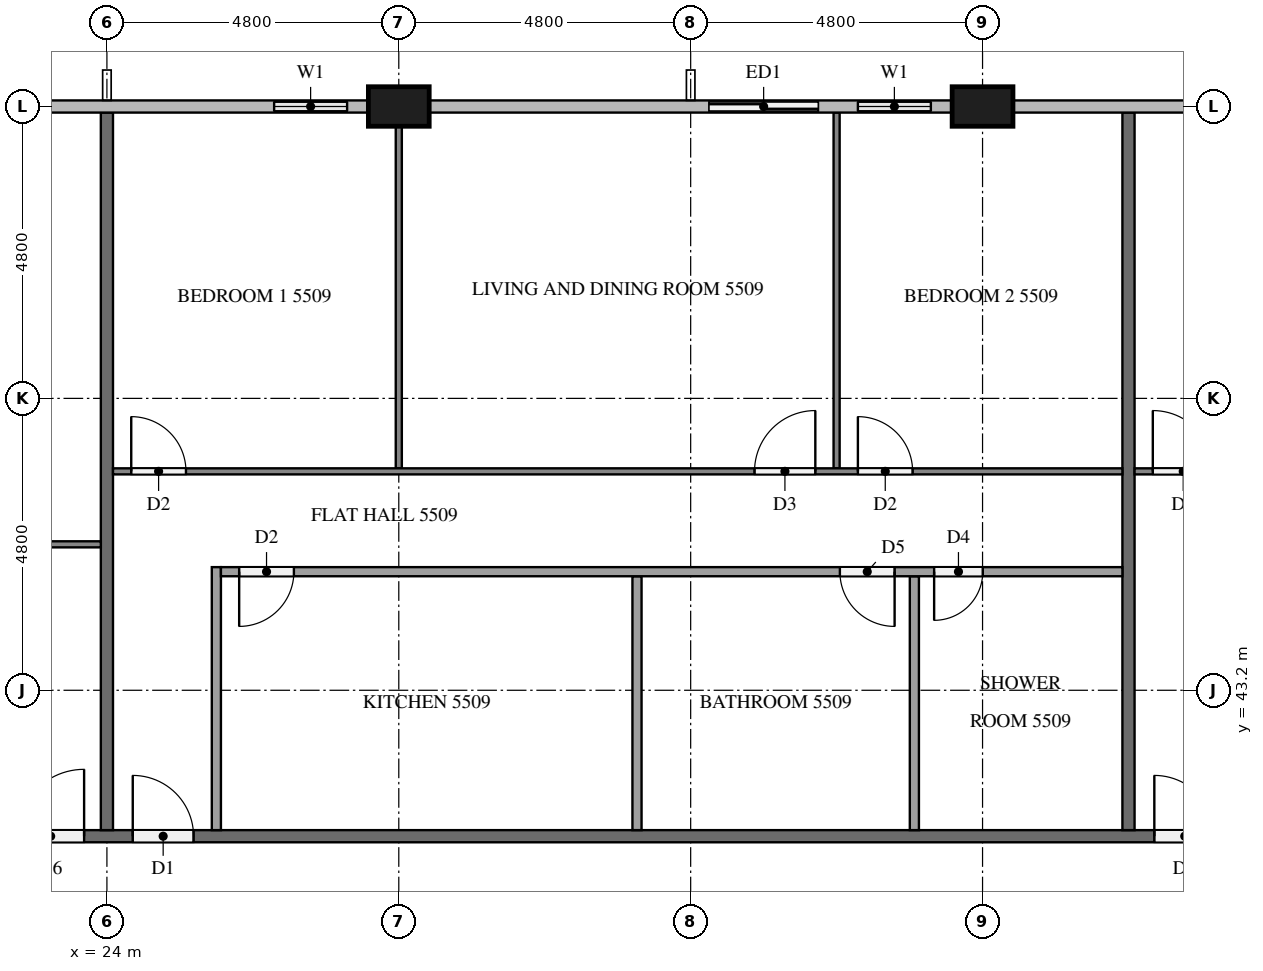
"""IFC4 building model, lengths in metres.
Left out: names, types, materials, properties, quantities, classifications, styles, units other than length and angle.
Written with IfcOpenShell. Run it as: python <this file> out.ifc"""

import sys

from ifc_helpers import new_model, si_unit, direction, frame, frame_2d, origin, origin_2d, place, context, subcontext, project, spatial, rectangle, extrude, element, fill, save


model = new_model("IFC4")
c1 = context("Model", 3, precision=1e-05, world=origin(), true_north=direction((0.0, 1.0)))
c2 = subcontext(c1, "Body", "Model", "MODEL_VIEW")
j1 = project(units=[si_unit("LENGTHUNIT", "METRE"), si_unit("PLANEANGLEUNIT", "RADIAN")], contexts=[c1])
p1 = place(None, origin())
s1 = spatial("IfcSite", under=j1, at=p1, CompositionType="ELEMENT")
p2 = place(p1, origin())
s2 = spatial("IfcBuilding", under=s1, at=p2, CompositionType="ELEMENT")
p3 = place(p2, frame((0.0, 0.0, 212.3)))
s3 = spatial("IfcBuildingStorey", under=s2, at=p3, CompositionType="ELEMENT", Elevation=212.3)
for number, where, z_axis, x_axis in (
    (1, (38.4, 52.8, 0.0), (0.0, 0.0, 1.0), (1.0, 0.0, 0.0)),
    (2, (28.8, 52.8, 0.0), (0.0, 0.0, 1.0), (1.0, 0.0, 0.0)),
):
    element("IfcColumn", number, at=place(p3, frame(where, z_axis=z_axis, x_axis=x_axis)), inside=s3, PredefinedType="COLUMN", context=c2, shape_type="SweptSolid", body=[
        extrude(rectangle(XDim=1.0, YDim=0.65, at=origin_2d()), origin(), (0.0, 0.0, 1.0), 3.2),
    ])
p4 = place(p3, frame((37.9, 52.8, 0.0), z_axis=(0.0, 0.0, 1.0), x_axis=(-1.0, 0.0, 0.0)))
e3 = element("IfcWall", 3, at=p4, inside=s3, PredefinedType="SOLIDWALL", context=c2, shape_type="SweptSolid", body=[
    extrude(rectangle(XDim=4.3, YDim=0.15, at=frame_2d((2.15, 0.0))), origin(), (0.0, 0.0, 1.0), 3.2),
])
p5 = place(p4, frame((0.35, 0.0, 0.9)))
e4 = element("IfcOpeningElement", 4, at=p5, cuts=e3, PredefinedType="OPENING", context=c2, shape_type="SweptSolid", body=[
    extrude(rectangle(XDim=1.2, YDim=1.4, at=frame_2d((0.6, 0.7))), frame((0.0, 0.085, 0.0), z_axis=(0.0, -1.0, 0.0), x_axis=(1.0, 0.0, 0.0)), (0.0, 0.0, 1.0), 0.17),
])
p6 = place(p4, frame((2.2, 0.0, 0.0)))
e5 = element("IfcOpeningElement", 5, at=p6, cuts=e3, PredefinedType="OPENING", context=c2, shape_type="SweptSolid", body=[
    extrude(rectangle(XDim=1.8, YDim=2.4, at=frame_2d((0.9, 1.2))), frame((0.0, 0.085, 0.0), z_axis=(0.0, -1.0, 0.0), x_axis=(1.0, 0.0, 0.0)), (0.0, 0.0, 1.0), 0.17),
])
p7 = place(p3, frame((28.3, 52.8, 0.0), z_axis=(0.0, 0.0, 1.0), x_axis=(-1.0, 0.0, 0.0)))
e6 = element("IfcWall", 6, at=p7, inside=s3, PredefinedType="SOLIDWALL", context=c2, shape_type="SweptSolid", body=[
    extrude(rectangle(XDim=1.9, YDim=0.15, at=frame_2d((0.95, 0.0))), origin(), (0.0, 0.0, 1.0), 3.2),
])
p8 = place(p7, frame((0.35, 0.0, 0.9)))
e7 = element("IfcOpeningElement", 7, at=p8, cuts=e6, PredefinedType="OPENING", context=c2, shape_type="SweptSolid", body=[
    extrude(rectangle(XDim=1.2, YDim=1.4, at=frame_2d((0.6, 0.7))), frame((0.0, 0.085, 0.0), z_axis=(0.0, -1.0, 0.0), x_axis=(1.0, 0.0, 0.0)), (0.0, 0.0, 1.0), 0.17),
])
p9 = place(p3, frame((11.9, 40.8, 0.0), z_axis=(0.0, 0.0, 1.0), x_axis=(1.0, 0.0, 0.0)))
e8 = element("IfcWall", 8, at=p9, inside=s3, PredefinedType="PARTITIONING", context=c2, shape_type="SweptSolid", body=[
    extrude(rectangle(XDim=38.6, YDim=0.2, at=frame_2d((19.3, 0.0))), origin(), (0.0, 0.0, 1.0), 3.2),
])
p10 = place(p9, frame((36.525, 0.0, 0.0)))
e9 = element("IfcOpeningElement", 9, at=p10, cuts=e8, PredefinedType="OPENING", context=c2, shape_type="SweptSolid", body=[
    extrude(rectangle(XDim=1.0, YDim=2.1, at=frame_2d((0.5, 1.05))), frame((0.0, 0.11, 0.0), z_axis=(0.0, -1.0, 0.0), x_axis=(1.0, 0.0, 0.0)), (0.0, 0.0, 1.0), 0.22),
])
p11 = place(p9, frame((29.325, 0.0, 0.0)))
e10 = element("IfcOpeningElement", 10, at=p11, cuts=e8, PredefinedType="OPENING", context=c2, shape_type="SweptSolid", body=[
    extrude(rectangle(XDim=1.0, YDim=2.1, at=frame_2d((0.5, 1.05))), frame((0.0, 0.11, 0.0), z_axis=(0.0, -1.0, 0.0), x_axis=(1.0, 0.0, 0.0)), (0.0, 0.0, 1.0), 0.22),
])
p12 = place(p9, frame((12.525, 0.0, 0.0)))
e11 = element("IfcOpeningElement", 11, at=p12, cuts=e8, PredefinedType="OPENING", context=c2, shape_type="SweptSolid", body=[
    extrude(rectangle(XDim=1.0, YDim=2.1, at=frame_2d((0.5, 1.05))), frame((0.0, 0.11, 0.0), z_axis=(0.0, -1.0, 0.0), x_axis=(1.0, 0.0, 0.0)), (0.0, 0.0, 1.0), 0.22),
])
p13 = place(p9, frame((10.625, 0.0, 0.0)))
e12 = element("IfcOpeningElement", 12, at=p13, cuts=e8, PredefinedType="OPENING", context=c2, shape_type="SweptSolid", body=[
    extrude(rectangle(XDim=1.1, YDim=2.1, at=frame_2d((0.55, 1.05))), frame((0.0, 0.11, 0.0), z_axis=(0.0, -1.0, 0.0), x_axis=(1.0, 0.0, 0.0)), (0.0, 0.0, 1.0), 0.22),
])
for number, where, z_axis, x_axis in (
    (13, (40.8, 52.7, 0.0), (0.0, 0.0, 1.0), (0.0, -1.0, 0.0)),
    (14, (24.0, 52.7, 0.0), (0.0, 0.0, 1.0), (0.0, -1.0, 0.0)),
):
    element("IfcWall", number, at=place(p3, frame(where, z_axis=z_axis, x_axis=x_axis)), inside=s3, PredefinedType="PARTITIONING", context=c2, shape_type="SweptSolid", body=[
        extrude(rectangle(XDim=11.8, YDim=0.2, at=frame_2d((5.9, 0.0))), origin(), (0.0, 0.0, 1.0), 3.2),
    ])
p14 = place(p3, frame((40.9, 46.8, 0.0), z_axis=(0.0, 0.0, 1.0), x_axis=(1.0, 0.0, 0.0)))
e15 = element("IfcWall", 15, at=p14, inside=s3, PredefinedType="PARTITIONING", context=c2, shape_type="SweptSolid", body=[
    extrude(rectangle(XDim=7.0, YDim=0.1, at=frame_2d((3.5, 0.0))), origin(), (0.0, 0.0, 1.0), 3.2),
])
p15 = place(p14, frame((0.3, 0.0, 0.0)))
e16 = element("IfcOpeningElement", 16, at=p15, cuts=e15, PredefinedType="OPENING", context=c2, shape_type="SweptSolid", body=[
    extrude(rectangle(XDim=1.0, YDim=2.1, at=frame_2d((0.5, 1.05))), frame((0.0, 0.06, 0.0), z_axis=(0.0, -1.0, 0.0), x_axis=(1.0, 0.0, 0.0)), (0.0, 0.0, 1.0), 0.12),
])
p16 = place(p3, frame((28.8, 46.85, 0.0), z_axis=(0.0, 0.0, 1.0), x_axis=(0.0, 1.0, 0.0)))
e17 = element("IfcWall", 17, at=p16, inside=s3, PredefinedType="PARTITIONING", context=c2, shape_type="SweptSolid", body=[
    extrude(rectangle(XDim=5.625, YDim=0.1, at=frame_2d((2.812, 0.0))), origin(), (0.0, 0.0, 1.0), 3.2),
])
p17 = place(p3, frame((36.0, 46.85, 0.0), z_axis=(0.0, 0.0, 1.0), x_axis=(0.0, 1.0, 0.0)))
e18 = element("IfcWall", 18, at=p17, inside=s3, PredefinedType="PARTITIONING", context=c2, shape_type="SweptSolid", body=[
    extrude(rectangle(XDim=5.85, YDim=0.1, at=frame_2d((2.925, 0.0))), origin(), (0.0, 0.0, 1.0), 3.2),
])
p18 = place(p3, frame((24.1, 46.8, 0.0), z_axis=(0.0, 0.0, 1.0), x_axis=(1.0, 0.0, 0.0)))
e19 = element("IfcWall", 19, at=p18, inside=s3, PredefinedType="PARTITIONING", context=c2, shape_type="SweptSolid", body=[
    extrude(rectangle(XDim=16.6, YDim=0.1, at=frame_2d((8.3, 0.0))), origin(), (0.0, 0.0, 1.0), 3.2),
])
p19 = place(p18, frame((0.3, 0.0, 0.0)))
e20 = element("IfcOpeningElement", 20, at=p19, cuts=e19, PredefinedType="OPENING", context=c2, shape_type="SweptSolid", body=[
    extrude(rectangle(XDim=0.9, YDim=2.1, at=frame_2d((0.45, 1.05))), frame((0.0, 0.06, 0.0), z_axis=(0.0, -1.0, 0.0), x_axis=(1.0, 0.0, 0.0)), (0.0, 0.0, 1.0), 0.12),
])
p20 = place(p18, frame((10.55, 0.0, 0.0)))
e21 = element("IfcOpeningElement", 21, at=p20, cuts=e19, PredefinedType="OPENING", context=c2, shape_type="SweptSolid", body=[
    extrude(rectangle(XDim=1.0, YDim=2.1, at=frame_2d((0.5, 1.05))), frame((0.0, 0.06, 0.0), z_axis=(0.0, -1.0, 0.0), x_axis=(1.0, 0.0, 0.0)), (0.0, 0.0, 1.0), 0.12),
])
p21 = place(p18, frame((12.25, 0.0, 0.0)))
e22 = element("IfcOpeningElement", 22, at=p21, cuts=e19, PredefinedType="OPENING", context=c2, shape_type="SweptSolid", body=[
    extrude(rectangle(XDim=0.9, YDim=2.1, at=frame_2d((0.45, 1.05))), frame((0.0, 0.06, 0.0), z_axis=(0.0, -1.0, 0.0), x_axis=(1.0, 0.0, 0.0)), (0.0, 0.0, 1.0), 0.12),
])
for number, where, z_axis, x_axis in (
    (23, (32.717, 40.9, 0.0), (0.0, 0.0, 1.0), (0.0, 1.0, 0.0)),
    (24, (37.279, 40.9, 0.0), (0.0, 0.0, 1.0), (0.0, 1.0, 0.0)),
):
    element("IfcWall", number, at=place(p3, frame(where, z_axis=z_axis, x_axis=x_axis)), inside=s3, PredefinedType="PARTITIONING", context=c2, shape_type="SweptSolid", body=[
        extrude(rectangle(XDim=4.175, YDim=0.15, at=frame_2d((2.087, 0.0))), origin(), (0.0, 0.0, 1.0), 3.2),
    ])
p22 = place(p3, frame((25.8, 40.9, 0.0), z_axis=(0.0, 0.0, 1.0), x_axis=(0.0, 1.0, 0.0)))
e25 = element("IfcWall", 25, at=p22, inside=s3, PredefinedType="PARTITIONING", context=c2, shape_type="SweptSolid", body=[
    extrude(rectangle(XDim=4.325, YDim=0.15, at=frame_2d((2.163, 0.0))), origin(), (0.0, 0.0, 1.0), 3.2),
])
p23 = place(p3, frame((40.7, 45.15, 0.0), z_axis=(0.0, 0.0, 1.0), x_axis=(-1.0, 0.0, 0.0)))
e26 = element("IfcWall", 26, at=p23, inside=s3, PredefinedType="PARTITIONING", context=c2, shape_type="SweptSolid", body=[
    extrude(rectangle(XDim=14.825, YDim=0.15, at=frame_2d((7.413, 0.0))), origin(), (0.0, 0.0, 1.0), 3.2),
])
p24 = place(p23, frame((13.625, 0.0, 0.0)))
e27 = element("IfcOpeningElement", 27, at=p24, cuts=e26, PredefinedType="OPENING", context=c2, shape_type="SweptSolid", body=[
    extrude(rectangle(XDim=0.9, YDim=2.1, at=frame_2d((0.45, 1.05))), frame((0.0, 0.085, 0.0), z_axis=(0.0, -1.0, 0.0), x_axis=(1.0, 0.0, 0.0)), (0.0, 0.0, 1.0), 0.17),
])
p25 = place(p23, frame((3.746, 0.0, 0.0)))
e28 = element("IfcOpeningElement", 28, at=p25, cuts=e26, PredefinedType="OPENING", context=c2, shape_type="SweptSolid", body=[
    extrude(rectangle(XDim=0.9, YDim=2.1, at=frame_2d((0.45, 1.05))), frame((0.0, 0.085, 0.0), z_axis=(0.0, -1.0, 0.0), x_axis=(1.0, 0.0, 0.0)), (0.0, 0.0, 1.0), 0.17),
])
p26 = place(p23, frame((2.296, 0.0, 0.0)))
e29 = element("IfcOpeningElement", 29, at=p26, cuts=e26, PredefinedType="OPENING", context=c2, shape_type="SweptSolid", body=[
    extrude(rectangle(XDim=0.8, YDim=2.1, at=frame_2d((0.4, 1.05))), frame((0.0, 0.085, 0.0), z_axis=(0.0, -1.0, 0.0), x_axis=(1.0, 0.0, 0.0)), (0.0, 0.0, 1.0), 0.17),
])
p27 = place(p3, frame((4.9, 45.6, 0.0), z_axis=(0.0, 0.0, 1.0), x_axis=(1.0, 0.0, 0.0)))
e30 = element("IfcWall", 30, at=p27, inside=s3, PredefinedType="PARTITIONING", context=c2, shape_type="SweptSolid", body=[
    extrude(rectangle(XDim=19.0, YDim=0.1, at=frame_2d((9.5, 0.0))), origin(), (0.0, 0.0, 1.0), 3.2),
])
p28 = place(p27, frame((14.65, 0.0, 0.0)))
e31 = element("IfcOpeningElement", 31, at=p28, cuts=e30, PredefinedType="OPENING", context=c2, shape_type="SweptSolid", body=[
    extrude(rectangle(XDim=0.9, YDim=2.1, at=frame_2d((0.45, 1.05))), frame((0.0, 0.06, 0.0), z_axis=(0.0, -1.0, 0.0), x_axis=(1.0, 0.0, 0.0)), (0.0, 0.0, 1.0), 0.12),
])
p29 = place(p27, frame((13.05, 0.0, 0.0)))
e32 = element("IfcOpeningElement", 32, at=p29, cuts=e30, PredefinedType="OPENING", context=c2, shape_type="SweptSolid", body=[
    extrude(rectangle(XDim=0.9, YDim=2.1, at=frame_2d((0.45, 1.05))), frame((0.0, 0.06, 0.0), z_axis=(0.0, -1.0, 0.0), x_axis=(1.0, 0.0, 0.0)), (0.0, 0.0, 1.0), 0.12),
])
p30 = place(p27, frame((5.05, 0.0, 0.0)))
e33 = element("IfcOpeningElement", 33, at=p30, cuts=e30, PredefinedType="OPENING", context=c2, shape_type="SweptSolid", body=[
    extrude(rectangle(XDim=0.9, YDim=2.1, at=frame_2d((0.45, 1.05))), frame((0.0, 0.06, 0.0), z_axis=(0.0, -1.0, 0.0), x_axis=(1.0, 0.0, 0.0)), (0.0, 0.0, 1.0), 0.12),
])
p31 = place(p27, frame((3.35, 0.0, 0.0)))
e34 = element("IfcOpeningElement", 34, at=p31, cuts=e30, PredefinedType="OPENING", context=c2, shape_type="SweptSolid", body=[
    extrude(rectangle(XDim=1.0, YDim=2.1, at=frame_2d((0.5, 1.05))), frame((0.0, 0.06, 0.0), z_axis=(0.0, -1.0, 0.0), x_axis=(1.0, 0.0, 0.0)), (0.0, 0.0, 1.0), 0.12),
])
p32 = place(p5, origin())
e35 = element("IfcWindow", 35, at=p32, inside=s3, PartitioningType="SINGLE_PANEL", PredefinedType="WINDOW", context=c2, shape_type="SweptSolid", body=[
    extrude(rectangle(XDim=1.2, YDim=1.4, at=frame_2d((0.6, 0.7))), frame((0.0, 0.03, 0.0), z_axis=(0.0, -1.0, 0.0), x_axis=(1.0, 0.0, 0.0)), (0.0, 0.0, 1.0), 0.06),
])
fill(e4, e35)
p33 = place(p6, origin())
e36 = element("IfcDoor", 36, at=p33, inside=s3, OperationType="SLIDING_TO_RIGHT", PredefinedType="DOOR", context=c2, shape_type="SweptSolid", body=[
    extrude(rectangle(XDim=1.8, YDim=2.4, at=frame_2d((0.9, 1.2))), frame((0.0, 0.025, 0.0), z_axis=(0.0, -1.0, 0.0), x_axis=(1.0, 0.0, 0.0)), (0.0, 0.0, 1.0), 0.05),
])
fill(e5, e36)
p34 = place(p8, origin())
e37 = element("IfcWindow", 37, at=p34, inside=s3, PartitioningType="SINGLE_PANEL", PredefinedType="WINDOW", context=c2, shape_type="SweptSolid", body=[
    extrude(rectangle(XDim=1.2, YDim=1.4, at=frame_2d((0.6, 0.7))), frame((0.0, 0.03, 0.0), z_axis=(0.0, -1.0, 0.0), x_axis=(1.0, 0.0, 0.0)), (0.0, 0.0, 1.0), 0.06),
])
fill(e7, e37)
p35 = place(p11, origin())
e38 = element("IfcDoor", 38, at=p35, inside=s3, OperationType="SINGLE_SWING_LEFT", PredefinedType="DOOR", context=c2, shape_type="SweptSolid", body=[
    extrude(rectangle(XDim=1.0, YDim=2.1, at=frame_2d((0.5, 1.05))), frame((0.0, 0.025, 0.0), z_axis=(0.0, -1.0, 0.0), x_axis=(1.0, 0.0, 0.0)), (0.0, 0.0, 1.0), 0.05),
])
fill(e10, e38)
p36 = place(p12, origin())
e39 = element("IfcDoor", 39, at=p36, inside=s3, OperationType="SINGLE_SWING_LEFT", PredefinedType="DOOR", context=c2, shape_type="SweptSolid", body=[
    extrude(rectangle(XDim=1.0, YDim=2.1, at=frame_2d((0.5, 1.05))), frame((0.0, 0.025, 0.0), z_axis=(0.0, -1.0, 0.0), x_axis=(1.0, 0.0, 0.0)), (0.0, 0.0, 1.0), 0.05),
])
fill(e11, e39)
p37 = place(p13, origin())
e40 = element("IfcDoor", 40, at=p37, inside=s3, OperationType="SINGLE_SWING_RIGHT", PredefinedType="DOOR", context=c2, shape_type="SweptSolid", body=[
    extrude(rectangle(XDim=1.1, YDim=2.1, at=frame_2d((0.55, 1.05))), frame((0.0, 0.025, 0.0), z_axis=(0.0, -1.0, 0.0), x_axis=(1.0, 0.0, 0.0)), (0.0, 0.0, 1.0), 0.05),
])
fill(e12, e40)
p38 = place(p15, origin())
e41 = element("IfcDoor", 41, at=p38, inside=s3, OperationType="SINGLE_SWING_LEFT", PredefinedType="DOOR", context=c2, shape_type="SweptSolid", body=[
    extrude(rectangle(XDim=1.0, YDim=2.1, at=frame_2d((0.5, 1.05))), frame((0.0, 0.025, 0.0), z_axis=(0.0, -1.0, 0.0), x_axis=(1.0, 0.0, 0.0)), (0.0, 0.0, 1.0), 0.05),
])
fill(e16, e41)
p39 = place(p19, origin())
e42 = element("IfcDoor", 42, at=p39, inside=s3, OperationType="SINGLE_SWING_LEFT", PredefinedType="DOOR", context=c2, shape_type="SweptSolid", body=[
    extrude(rectangle(XDim=0.9, YDim=2.1, at=frame_2d((0.45, 1.05))), frame((0.0, 0.025, 0.0), z_axis=(0.0, -1.0, 0.0), x_axis=(1.0, 0.0, 0.0)), (0.0, 0.0, 1.0), 0.05),
])
fill(e20, e42)
p40 = place(p20, origin())
e43 = element("IfcDoor", 43, at=p40, inside=s3, OperationType="SINGLE_SWING_RIGHT", PredefinedType="DOOR", context=c2, shape_type="SweptSolid", body=[
    extrude(rectangle(XDim=1.0, YDim=2.1, at=frame_2d((0.5, 1.05))), frame((0.0, 0.025, 0.0), z_axis=(0.0, -1.0, 0.0), x_axis=(1.0, 0.0, 0.0)), (0.0, 0.0, 1.0), 0.05),
])
fill(e21, e43)
p41 = place(p21, origin())
e44 = element("IfcDoor", 44, at=p41, inside=s3, OperationType="SINGLE_SWING_LEFT", PredefinedType="DOOR", context=c2, shape_type="SweptSolid", body=[
    extrude(rectangle(XDim=0.9, YDim=2.1, at=frame_2d((0.45, 1.05))), frame((0.0, 0.025, 0.0), z_axis=(0.0, -1.0, 0.0), x_axis=(1.0, 0.0, 0.0)), (0.0, 0.0, 1.0), 0.05),
])
fill(e22, e44)
p42 = place(p24, origin())
e45 = element("IfcDoor", 45, at=p42, inside=s3, OperationType="SINGLE_SWING_RIGHT", PredefinedType="DOOR", context=c2, shape_type="SweptSolid", body=[
    extrude(rectangle(XDim=0.9, YDim=2.1, at=frame_2d((0.45, 1.05))), frame((0.0, 0.025, 0.0), z_axis=(0.0, -1.0, 0.0), x_axis=(1.0, 0.0, 0.0)), (0.0, 0.0, 1.0), 0.05),
])
fill(e27, e45)
p43 = place(p25, origin())
e46 = element("IfcDoor", 46, at=p43, inside=s3, OperationType="SINGLE_SWING_LEFT", PredefinedType="DOOR", context=c2, shape_type="SweptSolid", body=[
    extrude(rectangle(XDim=0.9, YDim=2.1, at=frame_2d((0.45, 1.05))), frame((0.0, 0.025, 0.0), z_axis=(0.0, -1.0, 0.0), x_axis=(1.0, 0.0, 0.0)), (0.0, 0.0, 1.0), 0.05),
])
fill(e28, e46)
p44 = place(p26, origin())
e47 = element("IfcDoor", 47, at=p44, inside=s3, OperationType="SINGLE_SWING_RIGHT", PredefinedType="DOOR", context=c2, shape_type="SweptSolid", body=[
    extrude(rectangle(XDim=0.8, YDim=2.1, at=frame_2d((0.4, 1.05))), frame((0.0, 0.025, 0.0), z_axis=(0.0, -1.0, 0.0), x_axis=(1.0, 0.0, 0.0)), (0.0, 0.0, 1.0), 0.05),
])
fill(e29, e47)
save(model, sys.argv[1])
